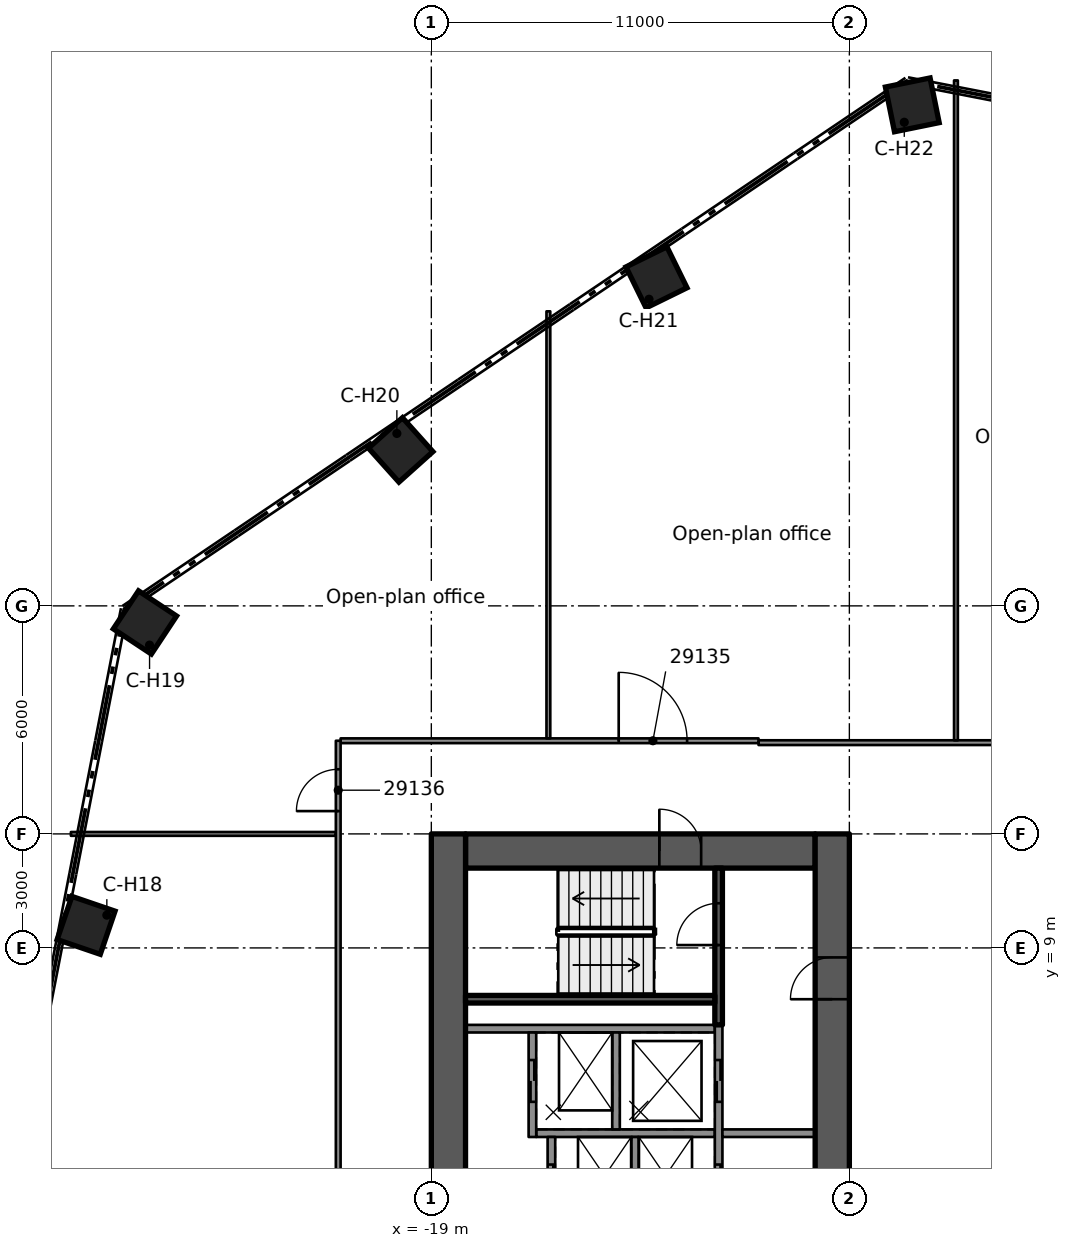
"""IFC4 building model, lengths in metres.
Left out: names, types, materials, properties, quantities, classifications, styles, units other than length and angle.
Written with IfcOpenShell. Run it as: python <this file> out.ifc"""

import sys

from ifc_helpers import new_model, si_unit, direction, frame, frame_2d, origin, origin_2d, place, context, subcontext, project, spatial, rectangle, extrude, element, fill, save


model = new_model("IFC4")
c1 = context("Model", 3, precision=1e-05, world=origin(), true_north=direction((0.0, 1.0)))
c2 = subcontext(c1, "Body", "Model", "MODEL_VIEW")
j1 = project(units=[si_unit("LENGTHUNIT", "METRE"), si_unit("PLANEANGLEUNIT", "RADIAN")], contexts=[c1])
p1 = place(None, origin())
s1 = spatial("IfcSite", under=j1, at=p1, CompositionType="ELEMENT")
p2 = place(p1, origin())
s2 = spatial("IfcBuilding", under=s1, at=p2, CompositionType="ELEMENT")
p3 = place(p2, frame((0.0, 0.0, 149.1)))
s3 = spatial("IfcBuildingStorey", under=s2, at=p3, CompositionType="ELEMENT", Elevation=149.1)
p4 = place(p3, frame((-18.1, 11.55, 0.0), z_axis=(0.0, 0.0, 1.0), x_axis=(1.0, 0.0, 0.0)))
e1 = element("IfcWall", 1, at=p4, inside=s3, PredefinedType="SHEAR", context=c2, shape_type="SweptSolid", body=[
    extrude(rectangle(XDim=9.2, YDim=0.9, at=frame_2d((4.6, 0.0))), origin(), (0.0, 0.0, 1.0), 3.5),
])
p5 = place(p4, frame((5.1, 0.0, 0.0)))
e2 = element("IfcOpeningElement", 2, at=p5, cuts=e1, PredefinedType="OPENING", context=c2, shape_type="SweptSolid", body=[
    extrude(rectangle(XDim=1.1, YDim=2.1, at=frame_2d((0.55, 1.05))), frame((0.0, 0.46, 0.0), z_axis=(0.0, -1.0, 0.0), x_axis=(1.0, 0.0, 0.0)), (0.0, 0.0, 1.0), 0.92),
])
p6 = place(p3, frame((-18.55, -12.0, 0.0), z_axis=(0.0, 0.0, 1.0), x_axis=(0.0, 1.0, 0.0)))
e3 = element("IfcWall", 3, at=p6, inside=s3, PredefinedType="SHEAR", context=c2, shape_type="SweptSolid", body=[
    extrude(rectangle(XDim=24.0, YDim=0.9, at=frame_2d((12.0, 0.0))), origin(), (0.0, 0.0, 1.0), 3.5),
])
p7 = place(p6, frame((10.1, 0.0, 0.0)))
e4 = element("IfcOpeningElement", 4, at=p7, cuts=e3, PredefinedType="OPENING", context=c2, shape_type="SweptSolid", body=[
    extrude(rectangle(XDim=1.8, YDim=2.1, at=frame_2d((0.9, 1.05))), frame((0.0, 0.46, 0.0), z_axis=(0.0, -1.0, 0.0), x_axis=(1.0, 0.0, 0.0)), (0.0, 0.0, 1.0), 0.92),
])
p8 = place(p3, frame((-8.45, -12.0, 0.0), z_axis=(0.0, 0.0, 1.0), x_axis=(0.0, 1.0, 0.0)))
e5 = element("IfcWall", 5, at=p8, inside=s3, PredefinedType="SHEAR", context=c2, shape_type="SweptSolid", body=[
    extrude(rectangle(XDim=24.0, YDim=0.9, at=frame_2d((12.0, 0.0))), origin(), (0.0, 0.0, 1.0), 3.5),
])
p9 = place(p8, frame((9.6, 0.0, 0.0)))
e6 = element("IfcOpeningElement", 6, at=p9, cuts=e5, PredefinedType="OPENING", context=c2, shape_type="SweptSolid", body=[
    extrude(rectangle(XDim=1.8, YDim=2.1, at=frame_2d((0.9, 1.05))), frame((0.0, 0.46, 0.0), z_axis=(0.0, -1.0, 0.0), x_axis=(1.0, 0.0, 0.0)), (0.0, 0.0, 1.0), 0.92),
])
p10 = place(p8, frame((19.65, 0.0, 0.0)))
e7 = element("IfcOpeningElement", 7, at=p10, cuts=e5, PredefinedType="OPENING", context=c2, shape_type="SweptSolid", body=[
    extrude(rectangle(XDim=1.1, YDim=2.1, at=frame_2d((0.55, 1.05))), frame((0.0, 0.46, 0.0), z_axis=(0.0, -1.0, 0.0), x_axis=(1.0, 0.0, 0.0)), (0.0, 0.0, 1.0), 0.92),
])
for number, where, z_axis, x_axis in (
    (8, (-28.085, 9.594, 0.0), (0.0, 0.0, 1.0), (-0.946, 0.323, 0.0)),
    (9, (-26.536, 17.564, 0.0), (0.0, 0.0, 1.0), (-0.834, 0.552, 0.0)),
    (10, (-19.806, 22.104, 0.0), (0.0, 0.0, 1.0), (-0.667, 0.745, 0.0)),
    (11, (-13.075, 26.644, 0.0), (0.0, 0.0, 1.0), (-0.441, 0.898, 0.0)),
    (12, (-6.344, 31.183, 0.0), (0.0, 0.0, 1.0), (-0.199, 0.98, 0.0)),
):
    element("IfcColumn", number, at=place(p3, frame(where, z_axis=z_axis, x_axis=x_axis)), inside=s3, PredefinedType="COLUMN", context=c2, shape_type="SweptSolid", body=[
        extrude(rectangle(XDim=1.2, YDim=1.2, at=origin_2d()), origin(), (0.0, 0.0, 1.0), 3.5),
    ])
p11 = place(p3, frame((-11.54, 6.875, 0.0), z_axis=(0.0, 0.0, 1.0), x_axis=(-1.0, 0.0, 0.0)))
e13 = element("IfcWall", 13, at=p11, inside=s3, PredefinedType="SOLIDWALL", context=c2, shape_type="SweptSolid", body=[
    extrude(rectangle(XDim=6.56, YDim=0.2, at=frame_2d((3.28, 0.0))), origin(), (0.0, 0.0, 1.0), 3.09),
])
p12 = place(p3, frame((-11.54, 4.125, 0.0), z_axis=(0.0, 0.0, 1.0), x_axis=(-1.0, 0.0, 0.0)))
e14 = element("IfcWall", 14, at=p12, inside=s3, PredefinedType="SOLIDWALL", context=c2, shape_type="SweptSolid", body=[
    extrude(rectangle(XDim=4.7, YDim=0.2, at=frame_2d((2.35, 0.0))), origin(), (0.0, 0.0, 1.0), 3.09),
])
p13 = place(p3, frame((-11.44, -6.975, 0.0), z_axis=(0.0, 0.0, 1.0), x_axis=(0.0, 1.0, 0.0)))
e15 = element("IfcWall", 15, at=p13, inside=s3, PredefinedType="SOLIDWALL", context=c2, shape_type="SweptSolid", body=[
    extrude(rectangle(XDim=13.95, YDim=0.2, at=frame_2d((6.975, 0.0))), origin(), (0.0, 0.0, 1.0), 3.09),
])
p14 = place(p13, frame((9.175, 0.0, 0.0)))
e16 = element("IfcOpeningElement", 16, at=p14, cuts=e15, PredefinedType="OPENING", context=c2, shape_type="SweptSolid", body=[
    extrude(rectangle(XDim=1.1, YDim=2.1, at=frame_2d((0.55, 1.05))), frame((0.0, 0.11, 0.0), z_axis=(0.0, -1.0, 0.0), x_axis=(1.0, 0.0, 0.0)), (0.0, 0.0, 1.0), 0.22),
])
p15 = place(p13, frame((11.925, 0.0, 0.0)))
e17 = element("IfcOpeningElement", 17, at=p15, cuts=e15, PredefinedType="OPENING", context=c2, shape_type="SweptSolid", body=[
    extrude(rectangle(XDim=1.1, YDim=2.1, at=frame_2d((0.55, 1.05))), frame((0.0, 0.11, 0.0), z_axis=(0.0, -1.0, 0.0), x_axis=(1.0, 0.0, 0.0)), (0.0, 0.0, 1.0), 0.22),
])
p16 = place(p13, frame((1.075, 0.0, 0.0)))
e18 = element("IfcOpeningElement", 18, at=p16, cuts=e15, PredefinedType="OPENING", context=c2, shape_type="SweptSolid", body=[
    extrude(rectangle(XDim=0.8, YDim=2.1, at=frame_2d((0.4, 1.05))), frame((0.0, 0.11, 0.0), z_axis=(0.0, -1.0, 0.0), x_axis=(1.0, 0.0, 0.0)), (0.0, 0.0, 1.0), 0.22),
])
p17 = place(p13, frame((3.825, 0.0, 0.0)))
e19 = element("IfcOpeningElement", 19, at=p17, cuts=e15, PredefinedType="OPENING", context=c2, shape_type="SweptSolid", body=[
    extrude(rectangle(XDim=0.8, YDim=2.1, at=frame_2d((0.4, 1.05))), frame((0.0, 0.11, 0.0), z_axis=(0.0, -1.0, 0.0), x_axis=(1.0, 0.0, 0.0)), (0.0, 0.0, 1.0), 0.22),
])
for number, where, z_axis, x_axis in (
    (20, (-13.64, 1.475, 0.0), (0.0, 0.0, 1.0), (0.0, 1.0, 0.0)),
    (21, (-14.14, 4.225, 0.0), (0.0, 0.0, 1.0), (0.0, 1.0, 0.0)),
):
    element("IfcWall", number, at=place(p3, frame(where, z_axis=z_axis, x_axis=x_axis)), inside=s3, PredefinedType="SOLIDWALL", context=c2, shape_type="SweptSolid", body=[
        extrude(rectangle(XDim=2.55, YDim=0.2, at=frame_2d((1.275, 0.0))), origin(), (0.0, 0.0, 1.0), 3.09),
    ])
p18 = place(p3, frame((-15.84, -4.025, 0.0), z_axis=(0.0, 0.0, 1.0), x_axis=(0.0, 1.0, 0.0)))
e22 = element("IfcWall", 22, at=p18, inside=s3, PredefinedType="SOLIDWALL", context=c2, shape_type="SweptSolid", body=[
    extrude(rectangle(XDim=8.05, YDim=0.2, at=frame_2d((4.025, 0.0))), origin(), (0.0, 0.0, 1.0), 3.09),
])
p19 = place(p18, frame((3.475, 0.0, 0.0)))
e23 = element("IfcOpeningElement", 23, at=p19, cuts=e22, PredefinedType="OPENING", context=c2, shape_type="SweptSolid", body=[
    extrude(rectangle(XDim=1.1, YDim=2.1, at=frame_2d((0.55, 1.05))), frame((0.0, 0.11, 0.0), z_axis=(0.0, -1.0, 0.0), x_axis=(1.0, 0.0, 0.0)), (0.0, 0.0, 1.0), 0.22),
])
p20 = place(p18, frame((6.225, 0.0, 0.0)))
e24 = element("IfcOpeningElement", 24, at=p20, cuts=e22, PredefinedType="OPENING", context=c2, shape_type="SweptSolid", body=[
    extrude(rectangle(XDim=1.1, YDim=2.1, at=frame_2d((0.55, 1.05))), frame((0.0, 0.11, 0.0), z_axis=(0.0, -1.0, 0.0), x_axis=(1.0, 0.0, 0.0)), (0.0, 0.0, 1.0), 0.22),
])
p21 = place(p3, frame((-16.34, 4.025, 0.0), z_axis=(0.0, 0.0, 1.0), x_axis=(0.0, 1.0, 0.0)))
e25 = element("IfcWall", 25, at=p21, inside=s3, PredefinedType="SOLIDWALL", context=c2, shape_type="SweptSolid", body=[
    extrude(rectangle(XDim=2.75, YDim=0.2, at=frame_2d((1.375, 0.0))), origin(), (0.0, 0.0, 1.0), 3.09),
])
p22 = place(p21, frame((0.925, 0.0, 0.0)))
e26 = element("IfcOpeningElement", 26, at=p22, cuts=e25, PredefinedType="OPENING", context=c2, shape_type="SweptSolid", body=[
    extrude(rectangle(XDim=1.1, YDim=2.1, at=frame_2d((0.55, 1.05))), frame((0.0, 0.11, 0.0), z_axis=(0.0, -1.0, 0.0), x_axis=(1.0, 0.0, 0.0)), (0.0, 0.0, 1.0), 0.22),
])
p23 = place(p3, frame((-11.44, 6.975, 0.0), z_axis=(0.0, 0.0, 1.0), x_axis=(0.0, 1.0, 0.0)))
e27 = element("IfcWall", 27, at=p23, inside=s3, PredefinedType="SOLIDWALL", context=c2, shape_type="SweptSolid", body=[
    extrude(rectangle(XDim=4.125, YDim=0.2, at=frame_2d((2.062, 0.0))), origin(), (0.0, 0.0, 1.0), 3.09),
])
p24 = place(p23, frame((2.1, 0.0, 0.0)))
e28 = element("IfcOpeningElement", 28, at=p24, cuts=e27, PredefinedType="OPENING", context=c2, shape_type="SweptSolid", body=[
    extrude(rectangle(XDim=1.1, YDim=2.1, at=frame_2d((0.55, 1.05))), frame((0.0, 0.11, 0.0), z_axis=(0.0, -1.0, 0.0), x_axis=(1.0, 0.0, 0.0)), (0.0, 0.0, 1.0), 0.22),
])
p25 = place(p3, frame((-11.54, 7.65, 0.0), z_axis=(0.0, 0.0, 1.0), x_axis=(-1.0, 0.0, 0.0)))
e29 = element("IfcWall", 29, at=p25, inside=s3, PredefinedType="SOLIDWALL", context=c2, shape_type="SweptSolid", body=[
    extrude(rectangle(XDim=6.56, YDim=0.2, at=frame_2d((3.28, 0.0))), origin(), (0.0, 0.0, 1.0), 3.09),
])
p26 = place(p3, frame((-8.9, 4.125, 0.0), z_axis=(0.0, 0.0, 1.0), x_axis=(-1.0, 0.0, 0.0)))
e30 = element("IfcWall", 30, at=p26, inside=s3, PredefinedType="PARTITIONING", context=c2, shape_type="SweptSolid", body=[
    extrude(rectangle(XDim=2.44, YDim=0.2, at=frame_2d((1.22, 0.0))), origin(), (0.0, 0.0, 1.0), 3.09),
])
p27 = place(p3, frame((-28.484, 12.0, 0.0), z_axis=(0.0, 0.0, 1.0), x_axis=(1.0, 0.0, 0.0)))
e31 = element("IfcWall", 31, at=p27, inside=s3, PredefinedType="PARTITIONING", context=c2, shape_type="SweptSolid", body=[
    extrude(rectangle(XDim=6.972, YDim=0.1, at=frame_2d((3.486, 0.0))), origin(), (0.0, 0.0, 1.0), 3.08),
])
p28 = place(p3, frame((-10.39, 14.401, 0.0), z_axis=(0.0, 0.0, 1.0), x_axis=(1.0, 0.0, 0.0)))
e32 = element("IfcWall", 32, at=p28, inside=s3, PredefinedType="PARTITIONING", context=c2, shape_type="SweptSolid", body=[
    extrude(rectangle(XDim=20.781, YDim=0.125, at=frame_2d((10.391, 0.0))), origin(), (0.0, 0.0, 1.0), 3.08),
])
p29 = place(p28, frame((12.49, 0.0, 0.0)))
e33 = element("IfcOpeningElement", 33, at=p29, cuts=e32, PredefinedType="OPENING", context=c2, shape_type="SweptSolid", body=[
    extrude(rectangle(XDim=1.1, YDim=2.1, at=frame_2d((0.55, 1.05))), frame((0.0, 0.073, 0.0), z_axis=(0.0, -1.0, 0.0), x_axis=(1.0, 0.0, 0.0)), (0.0, 0.0, 1.0), 0.145),
])
p30 = place(p28, frame((7.295, 0.0, 0.0)))
e34 = element("IfcOpeningElement", 34, at=p30, cuts=e32, PredefinedType="OPENING", context=c2, shape_type="SweptSolid", body=[
    extrude(rectangle(XDim=1.1, YDim=2.1, at=frame_2d((0.55, 1.05))), frame((0.0, 0.073, 0.0), z_axis=(0.0, -1.0, 0.0), x_axis=(1.0, 0.0, 0.0)), (0.0, 0.0, 1.0), 0.145),
])
p31 = place(p3, frame((-21.387, 14.451, 0.0), z_axis=(0.0, 0.0, 1.0), x_axis=(1.0, 0.0, 0.0)))
e35 = element("IfcWall", 35, at=p31, inside=s3, PredefinedType="PARTITIONING", context=c2, shape_type="SweptSolid", body=[
    extrude(rectangle(XDim=10.996, YDim=0.125, at=frame_2d((5.498, 0.0))), origin(), (0.0, 0.0, 1.0), 3.08),
])
p32 = place(p31, frame((7.317, 0.0, 0.0)))
e36 = element("IfcOpeningElement", 36, at=p32, cuts=e35, PredefinedType="OPENING", context=c2, shape_type="SweptSolid", body=[
    extrude(rectangle(XDim=1.8, YDim=2.1, at=frame_2d((0.9, 1.05))), frame((0.0, 0.073, 0.0), z_axis=(0.0, -1.0, 0.0), x_axis=(1.0, 0.0, 0.0)), (0.0, 0.0, 1.0), 0.145),
])
p33 = place(p3, frame((-5.195, 14.463, 0.0), z_axis=(0.0, 0.0, 1.0), x_axis=(0.0, 1.0, 0.0)))
e37 = element("IfcWall", 37, at=p33, inside=s3, PredefinedType="PARTITIONING", context=c2, shape_type="SweptSolid", body=[
    extrude(rectangle(XDim=17.363, YDim=0.1, at=frame_2d((8.682, 0.0))), origin(), (0.0, 0.0, 1.0), 3.08),
])
p34 = place(p3, frame((-15.92, 14.514, 0.0), z_axis=(0.0, 0.0, 1.0), x_axis=(0.0, 1.0, 0.0)))
e38 = element("IfcWall", 38, at=p34, inside=s3, PredefinedType="PARTITIONING", context=c2, shape_type="SweptSolid", body=[
    extrude(rectangle(XDim=11.236, YDim=0.1, at=frame_2d((5.618, 0.0))), origin(), (0.0, 0.0, 1.0), 3.08),
])
p35 = place(p3, frame((-21.45, -14.451, 0.0), z_axis=(0.0, 0.0, 1.0), x_axis=(0.0, 1.0, 0.0)))
e39 = element("IfcWall", 39, at=p35, inside=s3, PredefinedType="PARTITIONING", context=c2, shape_type="SweptSolid", body=[
    extrude(rectangle(XDim=28.902, YDim=0.125, at=frame_2d((14.451, 0.0))), origin(), (0.0, 0.0, 1.0), 3.08),
])
p36 = place(p35, frame((13.551, 0.0, 0.0)))
e40 = element("IfcOpeningElement", 40, at=p36, cuts=e39, PredefinedType="OPENING", context=c2, shape_type="SweptSolid", body=[
    extrude(rectangle(XDim=1.8, YDim=2.1, at=frame_2d((0.9, 1.05))), frame((0.0, 0.073, 0.0), z_axis=(0.0, -1.0, 0.0), x_axis=(1.0, 0.0, 0.0)), (0.0, 0.0, 1.0), 0.145),
])
p37 = place(p35, frame((27.051, 0.0, 0.0)))
e41 = element("IfcOpeningElement", 41, at=p37, cuts=e39, PredefinedType="OPENING", context=c2, shape_type="SweptSolid", body=[
    extrude(rectangle(XDim=1.1, YDim=2.1, at=frame_2d((0.55, 1.05))), frame((0.0, 0.073, 0.0), z_axis=(0.0, -1.0, 0.0), x_axis=(1.0, 0.0, 0.0)), (0.0, 0.0, 1.0), 0.145),
])
p38 = place(p14, origin())
e42 = element("IfcDoor", 42, at=p38, inside=s3, OperationType="DOUBLE_DOOR_SLIDING", PredefinedType="DOOR", context=c2, shape_type="SweptSolid", body=[
    extrude(rectangle(XDim=1.1, YDim=2.1, at=frame_2d((0.55, 1.05))), frame((0.0, 0.025, 0.0), z_axis=(0.0, -1.0, 0.0), x_axis=(1.0, 0.0, 0.0)), (0.0, 0.0, 1.0), 0.05),
])
fill(e16, e42)
p39 = place(p20, origin())
e43 = element("IfcDoor", 43, at=p39, inside=s3, OperationType="DOUBLE_DOOR_SLIDING", PredefinedType="DOOR", context=c2, shape_type="SweptSolid", body=[
    extrude(rectangle(XDim=1.1, YDim=2.1, at=frame_2d((0.55, 1.05))), frame((0.0, 0.025, 0.0), z_axis=(0.0, -1.0, 0.0), x_axis=(1.0, 0.0, 0.0)), (0.0, 0.0, 1.0), 0.05),
])
fill(e24, e43)
p40 = place(p15, origin())
e44 = element("IfcDoor", 44, at=p40, inside=s3, OperationType="DOUBLE_DOOR_SLIDING", PredefinedType="DOOR", context=c2, shape_type="SweptSolid", body=[
    extrude(rectangle(XDim=1.1, YDim=2.1, at=frame_2d((0.55, 1.05))), frame((0.0, 0.025, 0.0), z_axis=(0.0, -1.0, 0.0), x_axis=(1.0, 0.0, 0.0)), (0.0, 0.0, 1.0), 0.05),
])
fill(e17, e44)
p41 = place(p22, origin())
e45 = element("IfcDoor", 45, at=p41, inside=s3, OperationType="DOUBLE_DOOR_SLIDING", PredefinedType="DOOR", context=c2, shape_type="SweptSolid", body=[
    extrude(rectangle(XDim=1.1, YDim=2.1, at=frame_2d((0.55, 1.05))), frame((0.0, 0.025, 0.0), z_axis=(0.0, -1.0, 0.0), x_axis=(1.0, 0.0, 0.0)), (0.0, 0.0, 1.0), 0.05),
])
fill(e26, e45)
p42 = place(p10, origin())
e46 = element("IfcDoor", 46, at=p42, inside=s3, OperationType="SINGLE_SWING_RIGHT", PredefinedType="DOOR", context=c2, shape_type="SweptSolid", body=[
    extrude(rectangle(XDim=1.1, YDim=2.1, at=frame_2d((0.55, 1.05))), frame((0.0, 0.025, 0.0), z_axis=(0.0, -1.0, 0.0), x_axis=(1.0, 0.0, 0.0)), (0.0, 0.0, 1.0), 0.05),
])
fill(e7, e46)
p43 = place(p5, origin())
e47 = element("IfcDoor", 47, at=p43, inside=s3, OperationType="SINGLE_SWING_RIGHT", PredefinedType="DOOR", context=c2, shape_type="SweptSolid", body=[
    extrude(rectangle(XDim=1.1, YDim=2.1, at=frame_2d((0.55, 1.05))), frame((0.0, 0.025, 0.0), z_axis=(0.0, -1.0, 0.0), x_axis=(1.0, 0.0, 0.0)), (0.0, 0.0, 1.0), 0.05),
])
fill(e2, e47)
p44 = place(p24, origin())
e48 = element("IfcDoor", 48, at=p44, inside=s3, OperationType="SINGLE_SWING_RIGHT", PredefinedType="DOOR", context=c2, shape_type="SweptSolid", body=[
    extrude(rectangle(XDim=1.1, YDim=2.1, at=frame_2d((0.55, 1.05))), frame((0.0, 0.025, 0.0), z_axis=(0.0, -1.0, 0.0), x_axis=(1.0, 0.0, 0.0)), (0.0, 0.0, 1.0), 0.05),
])
fill(e28, e48)
p45 = place(p32, origin())
e49 = element("IfcDoor", 49, at=p45, inside=s3, OperationType="DOUBLE_DOOR_SINGLE_SWING", PredefinedType="DOOR", context=c2, shape_type="SweptSolid", body=[
    extrude(rectangle(XDim=1.8, YDim=2.1, at=frame_2d((0.9, 1.05))), frame((0.0, 0.025, 0.0), z_axis=(0.0, -1.0, 0.0), x_axis=(1.0, 0.0, 0.0)), (0.0, 0.0, 1.0), 0.05),
])
fill(e36, e49)
p46 = place(p37, origin())
e50 = element("IfcDoor", 50, at=p46, inside=s3, OperationType="SINGLE_SWING_RIGHT", PredefinedType="DOOR", context=c2, shape_type="SweptSolid", body=[
    extrude(rectangle(XDim=1.1, YDim=2.1, at=frame_2d((0.55, 1.05))), frame((0.0, 0.025, 0.0), z_axis=(0.0, -1.0, 0.0), x_axis=(1.0, 0.0, 0.0)), (0.0, 0.0, 1.0), 0.05),
])
fill(e41, e50)
save(model, sys.argv[1])
